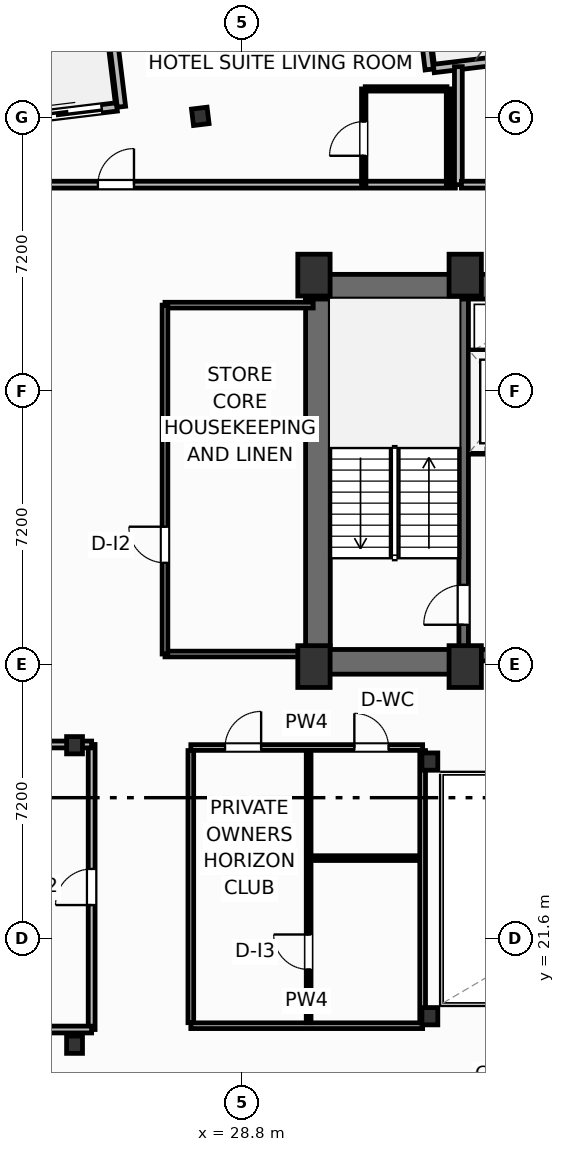
"""IFC4 building model, lengths in metres.
Left out: names, types, materials, properties, quantities, classifications, styles, units other than length and angle.
Written with IfcOpenShell. Run it as: python <this file> out.ifc"""

import sys

from ifc_helpers import new_model, si_unit, direction, frame, frame_2d, origin, origin_2d, place, context, subcontext, project, spatial, rectangle, i_section, extrude, element, fill, save


model = new_model("IFC4")
c1 = context("Model", 3, precision=1e-05, world=origin(), true_north=direction((0.0, 1.0)))
c2 = subcontext(c1, "Body", "Model", "MODEL_VIEW")
j1 = project(units=[si_unit("LENGTHUNIT", "METRE"), si_unit("PLANEANGLEUNIT", "RADIAN")], contexts=[c1])
p1 = place(None, origin())
s1 = spatial("IfcSite", under=j1, at=p1, CompositionType="ELEMENT")
p2 = place(p1, origin())
s2 = spatial("IfcBuilding", under=s1, at=p2, CompositionType="ELEMENT")
p3 = place(p2, frame((0.0, 0.0, 167.2)))
s3 = spatial("IfcBuildingStorey", under=s2, at=p3, CompositionType="ELEMENT", Elevation=167.2)
for number, where, z_axis, x_axis in (
    (1, (30.7, 28.75, 0.0), (0.0, 0.0, 1.0), (1.0, 0.0, 0.0)),
    (2, (34.68, 28.75, 0.0), (0.0, 0.0, 1.0), (1.0, 0.0, 0.0)),
    (3, (30.7, 39.05, 0.0), (0.0, 0.0, 1.0), (1.0, 0.0, 0.0)),
    (4, (34.68, 39.05, 0.0), (0.0, 0.0, 1.0), (1.0, 0.0, 0.0)),
):
    element("IfcColumn", number, at=place(p3, frame(where, z_axis=z_axis, x_axis=x_axis)), inside=s3, PredefinedType="COLUMN", context=c2, shape_type="SweptSolid", body=[
        extrude(rectangle(XDim=0.85, YDim=1.1, at=origin_2d()), origin(), (0.0, 0.0, 1.0), 3.7),
    ])
for number, where, z_axis, x_axis in (
    (5, (33.75, 19.55, 0.0), (0.0, 0.0, 1.0), (1.0, 0.0, 0.0)),
    (6, (33.75, 26.25, 0.0), (0.0, 0.0, 1.0), (1.0, 0.0, 0.0)),
    (7, (24.4, 18.8, 0.0), (0.0, 0.0, 1.0), (1.0, 0.0, 0.0)),
    (8, (24.4, 26.68, 0.0), (0.0, 0.0, 1.0), (1.0, 0.0, 0.0)),
):
    element("IfcColumn", number, at=place(p3, frame(where, z_axis=z_axis, x_axis=x_axis)), inside=s3, PredefinedType="COLUMN", context=c2, shape_type="SweptSolid", body=[
        extrude(i_section(OverallWidth=0.418, OverallDepth=0.455, WebThickness=0.042, FlangeThickness=0.068, FilletRadius=0.025, at=origin_2d()), origin(), (0.0, 0.0, 1.0), 3.7),
    ])
p4 = place(p3, frame((30.48, 38.745, 0.0), z_axis=(0.0, 0.0, 1.0), x_axis=(1.0, 0.0, 0.0)))
e9 = element("IfcWall", 9, at=p4, inside=s3, PredefinedType="SHEAR", context=c2, shape_type="SweptSolid", body=[
    extrude(rectangle(XDim=17.44, YDim=0.65, at=frame_2d((8.72, 0.0))), origin(), (0.0, 0.0, 1.0), 3.45),
])
p5 = place(p3, frame((30.805, 29.2, 0.0), z_axis=(0.0, 0.0, 1.0), x_axis=(0.0, 1.0, 0.0)))
e10 = element("IfcWall", 10, at=p5, inside=s3, PredefinedType="SHEAR", context=c2, shape_type="SweptSolid", body=[
    extrude(rectangle(XDim=9.22, YDim=0.65, at=frame_2d((4.61, 0.0))), origin(), (0.0, 0.0, 1.0), 3.45),
])
p6 = place(p3, frame((30.48, 28.875, 0.0), z_axis=(0.0, 0.0, 1.0), x_axis=(1.0, 0.0, 0.0)))
e11 = element("IfcWall", 11, at=p6, inside=s3, PredefinedType="SHEAR", context=c2, shape_type="SweptSolid", body=[
    extrude(rectangle(XDim=4.32, YDim=0.65, at=frame_2d((2.16, 0.0))), origin(), (0.0, 0.0, 1.0), 3.45),
])
p7 = place(p3, frame((34.8, 29.05, 0.0), z_axis=(0.0, 0.0, 1.0), x_axis=(1.0, 0.0, 0.0)))
e12 = element("IfcWall", 12, at=p7, inside=s3, PredefinedType="SHEAR", context=c2, shape_type="SweptSolid", body=[
    extrude(rectangle(XDim=8.8, YDim=0.3, at=frame_2d((4.4, 0.0))), origin(), (0.0, 0.0, 1.0), 3.45),
])
p8 = place(p7, frame((0.95, 0.0, 0.0)))
e13 = element("IfcOpeningElement", 13, at=p8, cuts=e12, PredefinedType="OPENING", context=c2, shape_type="SweptSolid", body=[
    extrude(rectangle(XDim=1.1, YDim=2.15, at=frame_2d((0.55, 1.075))), frame((0.0, 0.16, 0.0), z_axis=(0.0, -1.0, 0.0), x_axis=(1.0, 0.0, 0.0)), (0.0, 0.0, 1.0), 0.32),
])
p9 = place(p7, frame((6.75, 0.0, 0.0)))
e14 = element("IfcOpeningElement", 14, at=p9, cuts=e12, PredefinedType="OPENING", context=c2, shape_type="SweptSolid", body=[
    extrude(rectangle(XDim=1.1, YDim=2.15, at=frame_2d((0.55, 1.075))), frame((0.0, 0.16, 0.0), z_axis=(0.0, -1.0, 0.0), x_axis=(1.0, 0.0, 0.0)), (0.0, 0.0, 1.0), 0.32),
])
p10 = place(p7, frame((3.32, 0.0, 0.0)))
e15 = element("IfcOpeningElement", 15, at=p10, cuts=e12, PredefinedType="OPENING", context=c2, shape_type="SweptSolid", body=[
    extrude(rectangle(XDim=0.95, YDim=2.15, at=frame_2d((0.475, 1.075))), frame((0.0, 0.16, 0.0), z_axis=(0.0, -1.0, 0.0), x_axis=(1.0, 0.0, 0.0)), (0.0, 0.0, 1.0), 0.32),
])
p11 = place(p3, frame((34.64, 29.2, 0.0), z_axis=(0.0, 0.0, 1.0), x_axis=(0.0, 1.0, 0.0)))
e16 = element("IfcWall", 16, at=p11, inside=s3, PredefinedType="SHEAR", context=c2, shape_type="SweptSolid", body=[
    extrude(rectangle(XDim=9.22, YDim=0.25, at=frame_2d((4.61, 0.0))), origin(), (0.0, 0.0, 1.0), 3.45),
])
p12 = place(p11, frame((0.65, 0.0, 0.0)))
e17 = element("IfcOpeningElement", 17, at=p12, cuts=e16, PredefinedType="OPENING", context=c2, shape_type="SweptSolid", body=[
    extrude(rectangle(XDim=1.05, YDim=2.15, at=frame_2d((0.525, 1.075))), frame((0.0, 0.135, 0.0), z_axis=(0.0, -1.0, 0.0), x_axis=(1.0, 0.0, 0.0)), (0.0, 0.0, 1.0), 0.27),
])
p13 = place(p3, frame((27.709, 43.227, 0.0), z_axis=(0.0, 0.0, 1.0), x_axis=(0.992732158755, 0.12034475881, 0.0)))
e18 = element("IfcColumn", 18, at=p13, inside=s3, PredefinedType="COLUMN", context=c2, shape_type="SweptSolid", body=[
    extrude(i_section(OverallWidth=0.412, OverallDepth=0.435, WebThickness=0.036, FlangeThickness=0.057, FilletRadius=0.025, at=origin_2d()), origin(), (0.0, 0.0, 1.0), 3.7),
])
p14 = place(p3, frame((19.557, 42.753, 0.0), z_axis=(0.0, 0.0, 1.0), x_axis=(0.992729951822, 0.120362962556, 0.0)))
e19 = element("IfcWall", 19, at=p14, inside=s3, PredefinedType="SOLIDWALL", context=c2, shape_type="SweptSolid", body=[
    extrude(rectangle(XDim=6.0, YDim=0.22, at=frame_2d((3.0, 0.0))), origin(), (0.0, 0.0, 1.0), 2.73),
])
p15 = place(p14, frame((3.5, 0.0, 0.0)))
e20 = element("IfcOpeningElement", 20, at=p15, cuts=e19, PredefinedType="OPENING", context=c2, shape_type="SweptSolid", body=[
    extrude(rectangle(XDim=2.1, YDim=2.3, at=frame_2d((1.05, 1.15))), frame((0.0, 0.12, 0.0), z_axis=(0.0, -1.0, 0.0), x_axis=(1.0, 0.0, 0.0)), (0.0, 0.0, 1.0), 0.24),
])
p16 = place(p14, frame((0.55, 0.0, 0.75)))
e21 = element("IfcOpeningElement", 21, at=p16, cuts=e19, PredefinedType="OPENING", context=c2, shape_type="SweptSolid", body=[
    extrude(rectangle(XDim=1.85, YDim=1.75, at=frame_2d((0.925, 0.875))), frame((0.0, 0.12, 0.0), z_axis=(0.0, -1.0, 0.0), x_axis=(1.0, 0.0, 0.0)), (0.0, 0.0, 1.0), 0.24),
])
p17 = place(p3, frame((33.852, 44.486, 0.0), z_axis=(0.0, 0.0, 1.0), x_axis=(0.992729951822, 0.120362962556, 0.0)))
e22 = element("IfcWall", 22, at=p17, inside=s3, PredefinedType="SOLIDWALL", context=c2, shape_type="SweptSolid", body=[
    extrude(rectangle(XDim=6.0, YDim=0.22, at=frame_2d((3.0, 0.0))), origin(), (0.0, 0.0, 1.0), 2.73),
])
p18 = place(p17, frame((3.5, 0.0, 0.0)))
e23 = element("IfcOpeningElement", 23, at=p18, cuts=e22, PredefinedType="OPENING", context=c2, shape_type="SweptSolid", body=[
    extrude(rectangle(XDim=2.1, YDim=2.3, at=frame_2d((1.05, 1.15))), frame((0.0, 0.12, 0.0), z_axis=(0.0, -1.0, 0.0), x_axis=(1.0, 0.0, 0.0)), (0.0, 0.0, 1.0), 0.24),
])
p19 = place(p3, frame((33.734, 44.461, 0.0), z_axis=(0.0, 0.0, 1.0), x_axis=(-0.120327895535, 0.992734202874, 0.0)))
e24 = element("IfcWall", 24, at=p19, inside=s3, PredefinedType="SOLIDWALL", context=c2, shape_type="SweptSolid", body=[
    extrude(rectangle(XDim=2.1, YDim=0.22, at=frame_2d((1.05, 0.0))), origin(), (0.0, 0.0, 1.0), 2.73),
])
p20 = place(p3, frame((25.396, 45.44, 0.0), z_axis=(0.0, 0.0, 1.0), x_axis=(0.120275992932, -0.992740492538, 0.0)))
e25 = element("IfcWall", 25, at=p20, inside=s3, PredefinedType="SOLIDWALL", context=c2, shape_type="SweptSolid", body=[
    extrude(rectangle(XDim=1.975, YDim=0.22, at=frame_2d((0.988, 0.0))), origin(), (0.0, 0.0, 1.0), 2.73),
])
p21 = place(p3, frame((3.393, 41.43, 0.0), z_axis=(0.0, 0.0, 1.0), x_axis=(1.0, 0.0, 0.0)))
e26 = element("IfcWall", 26, at=p21, inside=s3, PredefinedType="PARTITIONING", context=c2, shape_type="SweptSolid", body=[
    extrude(rectangle(XDim=31.027, YDim=0.18, at=frame_2d((15.513, 0.0))), origin(), (0.0, 0.0, 1.0), 2.662),
])
p22 = place(p21, frame((21.621, 0.0, 0.0)))
e27 = element("IfcOpeningElement", 27, at=p22, cuts=e26, PredefinedType="OPENING", context=c2, shape_type="SweptSolid", body=[
    extrude(rectangle(XDim=0.95, YDim=2.15, at=frame_2d((0.475, 1.075))), frame((0.0, 0.1, 0.0), z_axis=(0.0, -1.0, 0.0), x_axis=(1.0, 0.0, 0.0)), (0.0, 0.0, 1.0), 0.2),
])
p23 = place(p3, frame((32.05, 43.95, 0.0), z_axis=(0.0, 0.0, 1.0), x_axis=(1.0, 0.0, 0.0)))
e28 = element("IfcWall", 28, at=p23, inside=s3, PredefinedType="PARTITIONING", context=c2, shape_type="SweptSolid", body=[
    extrude(rectangle(XDim=2.15, YDim=0.115, at=frame_2d((1.075, 0.0))), origin(), (0.0, 0.0, 1.0), 2.824),
])
p24 = place(p3, frame((32.01, 41.43, 0.0), z_axis=(0.0, 0.0, 1.0), x_axis=(0.0, 1.0, 0.0)))
e29 = element("IfcWall", 29, at=p24, inside=s3, PredefinedType="PARTITIONING", context=c2, shape_type="SweptSolid", body=[
    extrude(rectangle(XDim=2.52, YDim=0.115, at=frame_2d((1.26, 0.0))), origin(), (0.0, 0.0, 1.0), 3.45),
])
p25 = place(p24, frame((0.76, 0.0, 0.0)))
e30 = element("IfcOpeningElement", 30, at=p25, cuts=e29, PredefinedType="OPENING", context=c2, shape_type="SweptSolid", body=[
    extrude(rectangle(XDim=0.9, YDim=2.05, at=frame_2d((0.45, 1.025))), frame((0.0, 0.067, 0.0), z_axis=(0.0, -1.0, 0.0), x_axis=(1.0, 0.0, 0.0)), (0.0, 0.0, 1.0), 0.135),
])
p26 = place(p3, frame((34.24, 41.43, 0.0), z_axis=(0.0, 0.0, 1.0), x_axis=(0.0, 1.0, 0.0)))
e31 = element("IfcWall", 31, at=p26, inside=s3, PredefinedType="PARTITIONING", context=c2, shape_type="SweptSolid", body=[
    extrude(rectangle(XDim=2.52, YDim=0.115, at=frame_2d((1.26, 0.0))), origin(), (0.0, 0.0, 1.0), 3.45),
])
p27 = place(p3, frame((34.5, 41.43, 0.0), z_axis=(0.0, 0.0, 1.0), x_axis=(0.0, 1.0, 0.0)))
e32 = element("IfcWall", 32, at=p27, inside=s3, PredefinedType="PARTITIONING", context=c2, shape_type="SweptSolid", body=[
    extrude(rectangle(XDim=3.104, YDim=0.205, at=frame_2d((1.552, 0.0))), origin(), (0.0, 0.0, 1.0), 3.45),
])
p28 = place(p3, frame((34.58, 41.43, 0.0), z_axis=(0.0, 0.0, 1.0), x_axis=(1.0, 0.0, 0.0)))
e33 = element("IfcWall", 33, at=p28, inside=s3, PredefinedType="PARTITIONING", context=c2, shape_type="SweptSolid", body=[
    extrude(rectangle(XDim=11.84, YDim=0.18, at=frame_2d((5.92, 0.0))), origin(), (0.0, 0.0, 1.0), 3.45),
])
p29 = place(p28, frame((7.68, 0.0, 0.0)))
e34 = element("IfcOpeningElement", 34, at=p29, cuts=e33, PredefinedType="OPENING", context=c2, shape_type="SweptSolid", body=[
    extrude(rectangle(XDim=0.95, YDim=2.15, at=frame_2d((0.475, 1.075))), frame((0.0, 0.1, 0.0), z_axis=(0.0, -1.0, 0.0), x_axis=(1.0, 0.0, 0.0)), (0.0, 0.0, 1.0), 0.2),
])
p30 = place(p3, frame((24.85, 19.2, 0.0), z_axis=(0.0, 0.0, 1.0), x_axis=(0.0, 1.0, 0.0)))
e35 = element("IfcWall", 35, at=p30, inside=s3, PredefinedType="PARTITIONING", context=c2, shape_type="SweptSolid", body=[
    extrude(rectangle(XDim=7.5, YDim=0.18, at=frame_2d((3.75, 0.0))), origin(), (0.0, 0.0, 1.0), 3.45),
])
p31 = place(p30, frame((3.275, 0.0, 0.0)))
e36 = element("IfcOpeningElement", 36, at=p31, cuts=e35, PredefinedType="OPENING", context=c2, shape_type="SweptSolid", body=[
    extrude(rectangle(XDim=0.95, YDim=2.05, at=frame_2d((0.475, 1.025))), frame((0.0, 0.1, 0.0), z_axis=(0.0, -1.0, 0.0), x_axis=(1.0, 0.0, 0.0)), (0.0, 0.0, 1.0), 0.2),
])
p32 = place(p3, frame((4.562, 19.2, 0.0), z_axis=(0.0, 0.0, 1.0), x_axis=(1.0, 0.0, 0.0)))
e37 = element("IfcWall", 37, at=p32, inside=s3, PredefinedType="PARTITIONING", context=c2, shape_type="SweptSolid", body=[
    extrude(rectangle(XDim=20.288, YDim=0.18, at=frame_2d((10.144, 0.0))), origin(), (0.0, 0.0, 1.0), 3.45),
])
p33 = place(p3, frame((3.653, 26.7, 0.0), z_axis=(0.0, 0.0, 1.0), x_axis=(1.0, 0.0, 0.0)))
e38 = element("IfcWall", 38, at=p33, inside=s3, PredefinedType="PARTITIONING", context=c2, shape_type="SweptSolid", body=[
    extrude(rectangle(XDim=21.197, YDim=0.18, at=frame_2d((10.599, 0.0))), origin(), (0.0, 0.0, 1.0), 2.662),
])
p34 = place(p3, frame((34.8, 34.44, 0.0), z_axis=(0.0, 0.0, 1.0), x_axis=(1.0, 0.0, 0.0)))
e39 = element("IfcWall", 39, at=p34, inside=s3, PredefinedType="PARTITIONING", context=c2, shape_type="SweptSolid", body=[
    extrude(rectangle(XDim=2.18, YDim=0.2, at=frame_2d((1.09, 0.0))), origin(), (0.0, 0.0, 1.0), 3.45),
])
p35 = place(p34, frame((0.42, 0.0, 0.0)))
e40 = element("IfcOpeningElement", 40, at=p35, cuts=e39, PredefinedType="OPENING", context=c2, shape_type="SweptSolid", body=[
    extrude(rectangle(XDim=1.2, YDim=2.2, at=frame_2d((0.6, 1.1))), frame((0.0, 0.11, 0.0), z_axis=(0.0, -1.0, 0.0), x_axis=(1.0, 0.0, 0.0)), (0.0, 0.0, 1.0), 0.22),
])
p36 = place(p3, frame((34.8, 36.98, 0.0), z_axis=(0.0, 0.0, 1.0), x_axis=(1.0, 0.0, 0.0)))
e41 = element("IfcWall", 41, at=p36, inside=s3, PredefinedType="PARTITIONING", context=c2, shape_type="SweptSolid", body=[
    extrude(rectangle(XDim=2.18, YDim=0.2, at=frame_2d((1.09, 0.0))), origin(), (0.0, 0.0, 1.0), 3.45),
])
p37 = place(p3, frame((27.46, 26.62, 0.0), z_axis=(0.0, 0.0, 1.0), x_axis=(1.0, 0.0, 0.0)))
e42 = element("IfcWall", 42, at=p37, inside=s3, PredefinedType="PARTITIONING", context=c2, shape_type="SweptSolid", body=[
    extrude(rectangle(XDim=6.1, YDim=0.15, at=frame_2d((3.05, 0.0))), origin(), (0.0, 0.0, 1.0), 2.662),
])
p38 = place(p37, frame((0.9, 0.0, 0.0)))
e43 = element("IfcOpeningElement", 43, at=p38, cuts=e42, PredefinedType="OPENING", context=c2, shape_type="SweptSolid", body=[
    extrude(rectangle(XDim=0.95, YDim=2.05, at=frame_2d((0.475, 1.025))), frame((0.0, 0.085, 0.0), z_axis=(0.0, -1.0, 0.0), x_axis=(1.0, 0.0, 0.0)), (0.0, 0.0, 1.0), 0.17),
])
p39 = place(p37, frame((4.303, 0.0, 0.0)))
e44 = element("IfcOpeningElement", 44, at=p39, cuts=e42, PredefinedType="OPENING", context=c2, shape_type="SweptSolid", body=[
    extrude(rectangle(XDim=0.9, YDim=2.05, at=frame_2d((0.45, 1.025))), frame((0.0, 0.085, 0.0), z_axis=(0.0, -1.0, 0.0), x_axis=(1.0, 0.0, 0.0)), (0.0, 0.0, 1.0), 0.17),
])
p40 = place(p3, frame((27.46, 19.3, 0.0), z_axis=(0.0, 0.0, 1.0), x_axis=(1.0, 0.0, 0.0)))
e45 = element("IfcWall", 45, at=p40, inside=s3, PredefinedType="PARTITIONING", context=c2, shape_type="SweptSolid", body=[
    extrude(rectangle(XDim=6.1, YDim=0.15, at=frame_2d((3.05, 0.0))), origin(), (0.0, 0.0, 1.0), 2.662),
])
p41 = place(p3, frame((30.56, 19.38, 0.0), z_axis=(0.0, 0.0, 1.0), x_axis=(0.0, 1.0, 0.0)))
e46 = element("IfcWall", 46, at=p41, inside=s3, PredefinedType="PARTITIONING", context=c2, shape_type="SweptSolid", body=[
    extrude(rectangle(XDim=7.16, YDim=0.125, at=frame_2d((3.58, 0.0))), origin(), (0.0, 0.0, 1.0), 3.45),
])
p42 = place(p41, frame((1.4, 0.0, 0.0)))
e47 = element("IfcOpeningElement", 47, at=p42, cuts=e46, PredefinedType="OPENING", context=c2, shape_type="SweptSolid", body=[
    extrude(rectangle(XDim=0.92, YDim=2.05, at=frame_2d((0.46, 1.025))), frame((0.0, 0.073, 0.0), z_axis=(0.0, -1.0, 0.0), x_axis=(1.0, 0.0, 0.0)), (0.0, 0.0, 1.0), 0.145),
])
p43 = place(p3, frame((30.64, 23.71, 0.0), z_axis=(0.0, 0.0, 1.0), x_axis=(1.0, 0.0, 0.0)))
e48 = element("IfcWall", 48, at=p43, inside=s3, PredefinedType="PARTITIONING", context=c2, shape_type="SweptSolid", body=[
    extrude(rectangle(XDim=2.88, YDim=0.125, at=frame_2d((1.44, 0.0))), origin(), (0.0, 0.0, 1.0), 3.45),
])
p44 = place(p3, frame((27.46, 19.38, 0.0), z_axis=(0.0, 0.0, 1.0), x_axis=(0.0, 1.0, 0.0)))
e49 = element("IfcWall", 49, at=p44, inside=s3, PredefinedType="PARTITIONING", context=c2, shape_type="SweptSolid", body=[
    extrude(rectangle(XDim=7.16, YDim=0.15, at=frame_2d((3.58, 0.0))), origin(), (0.0, 0.0, 1.0), 3.45),
])
p45 = place(p3, frame((33.56, 19.38, 0.0), z_axis=(0.0, 0.0, 1.0), x_axis=(0.0, 1.0, 0.0)))
e50 = element("IfcWall", 50, at=p45, inside=s3, PredefinedType="PARTITIONING", context=c2, shape_type="SweptSolid", body=[
    extrude(rectangle(XDim=7.16, YDim=0.15, at=frame_2d((3.58, 0.0))), origin(), (0.0, 0.0, 1.0), 2.824),
])
p46 = place(p3, frame((26.78, 29.08, 0.0), z_axis=(0.0, 0.0, 1.0), x_axis=(1.0, 0.0, 0.0)))
e51 = element("IfcWall", 51, at=p46, inside=s3, PredefinedType="PARTITIONING", context=c2, shape_type="SweptSolid", body=[
    extrude(rectangle(XDim=3.7, YDim=0.15, at=frame_2d((1.85, 0.0))), origin(), (0.0, 0.0, 1.0), 3.45),
])
p47 = place(p3, frame((26.78, 38.26, 0.0), z_axis=(0.0, 0.0, 1.0), x_axis=(1.0, 0.0, 0.0)))
e52 = element("IfcWall", 52, at=p47, inside=s3, PredefinedType="PARTITIONING", context=c2, shape_type="SweptSolid", body=[
    extrude(rectangle(XDim=3.9, YDim=0.15, at=frame_2d((1.95, 0.0))), origin(), (0.0, 0.0, 1.0), 3.45),
])
p48 = place(p3, frame((26.78, 29.08, 0.0), z_axis=(0.0, 0.0, 1.0), x_axis=(0.0, 1.0, 0.0)))
e53 = element("IfcWall", 53, at=p48, inside=s3, PredefinedType="PARTITIONING", context=c2, shape_type="SweptSolid", body=[
    extrude(rectangle(XDim=9.18, YDim=0.15, at=frame_2d((4.59, 0.0))), origin(), (0.0, 0.0, 1.0), 3.45),
])
p49 = place(p48, frame((2.4, 0.0, 0.0)))
e54 = element("IfcOpeningElement", 54, at=p49, cuts=e53, PredefinedType="OPENING", context=c2, shape_type="SweptSolid", body=[
    extrude(rectangle(XDim=0.95, YDim=2.05, at=frame_2d((0.475, 1.025))), frame((0.0, 0.085, 0.0), z_axis=(0.0, -1.0, 0.0), x_axis=(1.0, 0.0, 0.0)), (0.0, 0.0, 1.0), 0.17),
])
p50 = place(p15, origin())
e55 = element("IfcDoor", 55, at=p50, inside=s3, OperationType="SLIDING_TO_LEFT", PredefinedType="DOOR", context=c2, shape_type="SweptSolid", body=[
    extrude(rectangle(XDim=2.1, YDim=2.3, at=frame_2d((1.05, 1.15))), frame((0.0, 0.025, 0.0), z_axis=(0.0, -1.0, 0.0), x_axis=(1.0, 0.0, 0.0)), (0.0, 0.0, 1.0), 0.05),
])
fill(e20, e55)
p51 = place(p22, origin())
e56 = element("IfcDoor", 56, at=p51, inside=s3, OperationType="SINGLE_SWING_RIGHT", PredefinedType="DOOR", context=c2, shape_type="SweptSolid", body=[
    extrude(rectangle(XDim=0.95, YDim=2.15, at=frame_2d((0.475, 1.075))), frame((0.0, 0.025, 0.0), z_axis=(0.0, -1.0, 0.0), x_axis=(1.0, 0.0, 0.0)), (0.0, 0.0, 1.0), 0.05),
])
fill(e27, e56)
p52 = place(p25, origin())
e57 = element("IfcDoor", 57, at=p52, inside=s3, OperationType="SINGLE_SWING_LEFT", PredefinedType="DOOR", context=c2, shape_type="SweptSolid", body=[
    extrude(rectangle(XDim=0.9, YDim=2.05, at=frame_2d((0.45, 1.025))), frame((0.0, 0.025, 0.0), z_axis=(0.0, -1.0, 0.0), x_axis=(1.0, 0.0, 0.0)), (0.0, 0.0, 1.0), 0.05),
])
fill(e30, e57)
p53 = place(p31, origin())
e58 = element("IfcDoor", 58, at=p53, inside=s3, OperationType="SINGLE_SWING_LEFT", PredefinedType="DOOR", context=c2, shape_type="SweptSolid", body=[
    extrude(rectangle(XDim=0.95, YDim=2.05, at=frame_2d((0.475, 1.025))), frame((0.0, 0.025, 0.0), z_axis=(0.0, -1.0, 0.0), x_axis=(1.0, 0.0, 0.0)), (0.0, 0.0, 1.0), 0.05),
])
fill(e36, e58)
p54 = place(p12, origin())
e59 = element("IfcDoor", 59, at=p54, inside=s3, OperationType="SINGLE_SWING_LEFT", PredefinedType="DOOR", context=c2, shape_type="SweptSolid", body=[
    extrude(rectangle(XDim=1.05, YDim=2.15, at=frame_2d((0.525, 1.075))), frame((0.0, 0.025, 0.0), z_axis=(0.0, -1.0, 0.0), x_axis=(1.0, 0.0, 0.0)), (0.0, 0.0, 1.0), 0.05),
])
fill(e17, e59)
p55 = place(p38, origin())
e60 = element("IfcDoor", 60, at=p55, inside=s3, OperationType="SINGLE_SWING_RIGHT", PredefinedType="DOOR", context=c2, shape_type="SweptSolid", body=[
    extrude(rectangle(XDim=0.95, YDim=2.05, at=frame_2d((0.475, 1.025))), frame((0.0, 0.025, 0.0), z_axis=(0.0, -1.0, 0.0), x_axis=(1.0, 0.0, 0.0)), (0.0, 0.0, 1.0), 0.05),
])
fill(e43, e60)
p56 = place(p39, origin())
e61 = element("IfcDoor", 61, at=p56, inside=s3, OperationType="SINGLE_SWING_LEFT", PredefinedType="DOOR", context=c2, shape_type="SweptSolid", body=[
    extrude(rectangle(XDim=0.9, YDim=2.05, at=frame_2d((0.45, 1.025))), frame((0.0, 0.025, 0.0), z_axis=(0.0, -1.0, 0.0), x_axis=(1.0, 0.0, 0.0)), (0.0, 0.0, 1.0), 0.05),
])
fill(e44, e61)
p57 = place(p42, origin())
e62 = element("IfcDoor", 62, at=p57, inside=s3, OperationType="SINGLE_SWING_RIGHT", PredefinedType="DOOR", context=c2, shape_type="SweptSolid", body=[
    extrude(rectangle(XDim=0.92, YDim=2.05, at=frame_2d((0.46, 1.025))), frame((0.0, 0.025, 0.0), z_axis=(0.0, -1.0, 0.0), x_axis=(1.0, 0.0, 0.0)), (0.0, 0.0, 1.0), 0.05),
])
fill(e47, e62)
p58 = place(p49, origin())
e63 = element("IfcDoor", 63, at=p58, inside=s3, OperationType="SINGLE_SWING_RIGHT", PredefinedType="DOOR", context=c2, shape_type="SweptSolid", body=[
    extrude(rectangle(XDim=0.95, YDim=2.05, at=frame_2d((0.475, 1.025))), frame((0.0, 0.025, 0.0), z_axis=(0.0, -1.0, 0.0), x_axis=(1.0, 0.0, 0.0)), (0.0, 0.0, 1.0), 0.05),
])
fill(e54, e63)
save(model, sys.argv[1])
